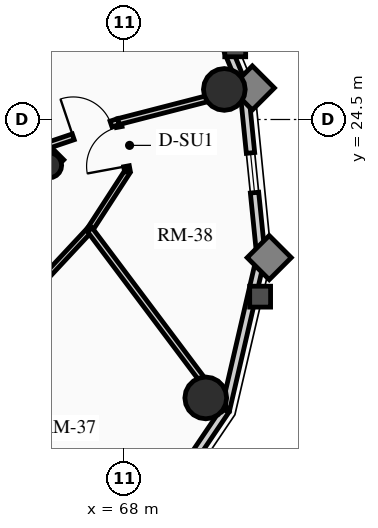
"""IFC4 building model, lengths in metres.
Left out: names, types, materials, properties, quantities, classifications, styles, units other than length and angle.
Written with IfcOpenShell. Run it as: python <this file> out.ifc"""

import sys

from ifc_helpers import new_model, si_unit, direction, frame, frame_2d, origin, origin_2d, place, context, subcontext, project, spatial, rectangle, circle, hollow_circle, extrude, source, transform, mapped, element, fill, save


model = new_model("IFC4")
c1 = context("Model", 3, precision=1e-05, world=origin(), true_north=direction((0.0, 1.0)))
c2 = subcontext(c1, "Body", "Model", "MODEL_VIEW")
j1 = project(units=[si_unit("LENGTHUNIT", "METRE"), si_unit("PLANEANGLEUNIT", "RADIAN")], contexts=[c1])
p1 = place(None, origin())
s1 = spatial("IfcSite", under=j1, at=p1, CompositionType="ELEMENT")
p2 = place(p1, origin())
s2 = spatial("IfcBuilding", under=s1, at=p2, CompositionType="ELEMENT")
p3 = place(p2, frame((0.0, 0.0, 219.94)))
s3 = spatial("IfcBuildingStorey", under=s2, at=p3, CompositionType="ELEMENT", Elevation=219.94)
p4 = place(p3, frame((66.268, 23.298, 0.0), z_axis=(0.0, 0.0, 1.0), x_axis=(-0.707106781187, 0.707106781187, 0.0)))
e1 = element("IfcWall", 1, at=p4, inside=s3, PredefinedType="SHEAR", context=c2, shape_type="SweptSolid", body=[
    extrude(rectangle(XDim=14.1, YDim=0.4, at=frame_2d((7.05, 0.0))), origin(), (0.0, 0.0, 1.0), 2.91),
])
p5 = place(p3, frame((58.561, 15.873, 0.0), z_axis=(0.0, 0.0, 1.0), x_axis=(0.707106781187, 0.707106781187, 0.0)))
e2 = element("IfcWall", 2, at=p5, inside=s3, PredefinedType="SHEAR", context=c2, shape_type="SweptSolid", body=[
    extrude(rectangle(XDim=10.7, YDim=0.4, at=frame_2d((5.35, 0.0))), origin(), (0.0, 0.0, 1.0), 2.91),
])
m1 = source(origin(), c2, "Body", "SweptSolid", [
    extrude(rectangle(XDim=1.5, YDim=2.02, at=frame_2d((0.75, 1.01))), frame((0.0, 0.21, 0.0), z_axis=(0.0, -1.0, 0.0), x_axis=(1.0, 0.0, 0.0)), (0.0, 0.0, 1.0), 0.42),
])
p6 = place(p5, frame((5.45, 0.0, 0.0)))
e3 = element("IfcOpeningElement", 3, at=p6, cuts=e2, PredefinedType="OPENING", context=c2, shape_type="MappedRepresentation", body=[
    mapped(m1, transform((0.0, 0.0, 0.0), x_axis=(1.0, 0.0, 0.0), y_axis=(0.0, 1.0, 0.0), z_axis=(0.0, 0.0, 1.0), scale=1.0)),
])
p7 = place(p3, frame((66.024, 23.294, 0.0), z_axis=(0.0, 0.0, 1.0), x_axis=(0.707106781187, 0.707106781187, 0.0)))
e4 = element("IfcColumn", 4, at=p7, inside=s3, PredefinedType="COLUMN", context=c2, shape_type="SweptSolid", body=[
    extrude(hollow_circle(Radius=0.33, WallThickness=0.025, at=origin_2d()), origin(), (0.0, 0.0, 1.0), 2.91),
])
for number, where, z_axis, x_axis in (
    (5, (70.146, 17.173, 0.0), (0.0, 0.0, 1.0), (1.0, 0.0, 0.0)),
    (6, (70.635, 25.291, 0.0), (0.0, 0.0, 1.0), (1.0, 0.0, 0.0)),
):
    element("IfcColumn", number, at=place(p3, frame(where, z_axis=z_axis, x_axis=x_axis)), inside=s3, PredefinedType="USERDEFINED", context=c2, shape_type="SweptSolid", body=[
        extrude(circle(Radius=0.55, at=origin_2d()), origin(), (0.0, 0.0, 1.0), 2.91),
    ])
p8 = place(p3, frame((70.663, 16.856, 0.0), z_axis=(0.0, 0.0, 1.0), x_axis=(-0.559495003079, -0.828833723692, 0.0)))
e7 = element("IfcWall", 7, at=p8, inside=s3, PredefinedType="SOLIDWALL", context=c2, shape_type="SweptSolid", body=[
    extrude(rectangle(XDim=3.976, YDim=0.22, at=frame_2d((1.988, 0.0))), origin(), (0.0, 0.0, 1.0), 2.322),
])
m2 = source(origin(), c2, "Body", "SweptSolid", [
    extrude(rectangle(XDim=1.05, YDim=1.3, at=frame_2d((0.525, 0.65))), frame((0.0, 0.12, 0.0), z_axis=(0.0, -1.0, 0.0), x_axis=(1.0, 0.0, 0.0)), (0.0, 0.0, 1.0), 0.24),
])
p9 = place(p8, frame((1.463, 0.0, 0.65)))
e8 = element("IfcOpeningElement", 8, at=p9, cuts=e7, PredefinedType="OPENING", context=c2, shape_type="MappedRepresentation", body=[
    mapped(m2, transform((0.0, 0.0, 0.0), x_axis=(1.0, 0.0, 0.0), y_axis=(0.0, 1.0, 0.0), z_axis=(0.0, 0.0, 1.0), scale=1.0)),
])
p10 = place(p3, frame((71.599, 20.9, 0.0), z_axis=(0.0, 0.0, 1.0), x_axis=(-0.225473813158, -0.974249228678, 0.0)))
e9 = element("IfcWall", 9, at=p10, inside=s3, PredefinedType="SOLIDWALL", context=c2, shape_type="SweptSolid", body=[
    extrude(rectangle(XDim=4.15, YDim=0.22, at=frame_2d((2.075, 0.0))), origin(), (0.0, 0.0, 1.0), 2.322),
])
p11 = place(p3, frame((71.155, 25.295, 0.0), z_axis=(0.0, 0.0, 1.0), x_axis=(0.100570534541, -0.994929930991, 0.0)))
e10 = element("IfcWall", 10, at=p11, inside=s3, PredefinedType="SOLIDWALL", context=c2, shape_type="SweptSolid", body=[
    extrude(rectangle(XDim=4.418, YDim=0.22, at=frame_2d((2.209, 0.0))), origin(), (0.0, 0.0, 1.0), 2.322),
])
p12 = place(p11, frame((1.684, 0.0, 0.65)))
e11 = element("IfcOpeningElement", 11, at=p12, cuts=e10, PredefinedType="OPENING", context=c2, shape_type="MappedRepresentation", body=[
    mapped(m2, transform((0.0, 0.0, 0.0), x_axis=(1.0, 0.0, 0.0), y_axis=(0.0, 1.0, 0.0), z_axis=(0.0, 0.0, 1.0), scale=1.0)),
])
p13 = place(p3, frame((69.374, 29.613, 0.0), z_axis=(0.0, 0.0, 1.0), x_axis=(0.381309704956, -0.924447353237, 0.0)))
e12 = element("IfcWall", 12, at=p13, inside=s3, PredefinedType="SOLIDWALL", context=c2, shape_type="SweptSolid", body=[
    extrude(rectangle(XDim=4.671, YDim=0.22, at=frame_2d((2.335, 0.0))), origin(), (0.0, 0.0, 1.0), 2.322),
])
p14 = place(p3, frame((62.736, 16.924, 0.0), z_axis=(0.0, 0.0, 1.0), x_axis=(0.681946700833, 0.731401871219, 0.0)))
e13 = element("IfcWall", 13, at=p14, inside=s3, PredefinedType="PARTITIONING", context=c2, shape_type="SweptSolid", body=[
    extrude(rectangle(XDim=6.393, YDim=0.15, at=frame_2d((3.196, 0.0))), origin(), (0.0, 0.0, 1.0), 2.255),
])
p15 = place(p3, frame((67.095, 21.6, 0.0), z_axis=(0.0, 0.0, 1.0), x_axis=(0.543773190184, 0.839232219137, 0.0)))
e14 = element("IfcWall", 14, at=p15, inside=s3, PredefinedType="PARTITIONING", context=c2, shape_type="SweptSolid", body=[
    extrude(rectangle(XDim=1.823, YDim=0.15, at=frame_2d((0.911, 0.0))), origin(), (0.0, 0.0, 1.0), 2.255),
])
p16 = place(p3, frame((68.086, 23.129, 0.0), z_axis=(0.0, 0.0, 1.0), x_axis=(-0.182004193146, 0.983297754334, 0.0)))
e15 = element("IfcWall", 15, at=p16, inside=s3, PredefinedType="PARTITIONING", context=c2, shape_type="SweptSolid", body=[
    extrude(rectangle(XDim=1.336, YDim=0.15, at=frame_2d((0.668, 0.0))), origin(), (0.0, 0.0, 1.0), 2.322),
])
m3 = source(origin(), c2, "Body", "SweptSolid", [
    extrude(rectangle(XDim=1.05, YDim=2.015, at=frame_2d((0.525, 1.007))), frame((0.0, 0.085, 0.0), z_axis=(0.0, -1.0, 0.0), x_axis=(1.0, 0.0, 0.0)), (0.0, 0.0, 1.0), 0.17),
])
p17 = place(p16, frame((0.143, 0.0, 0.0)))
e16 = element("IfcOpeningElement", 16, at=p17, cuts=e15, PredefinedType="OPENING", context=c2, shape_type="MappedRepresentation", body=[
    mapped(m3, transform((0.0, 0.0, 0.0), x_axis=(1.0, 0.0, 0.0), y_axis=(0.0, 1.0, 0.0), z_axis=(0.0, 0.0, 1.0), scale=1.0)),
])
p18 = place(p3, frame((67.095, 21.6, 0.0), z_axis=(0.0, 0.0, 1.0), x_axis=(0.599947190798, -0.800039604178, 0.0)))
e17 = element("IfcWall", 17, at=p18, inside=s3, PredefinedType="PARTITIONING", context=c2, shape_type="SweptSolid", body=[
    extrude(rectangle(XDim=5.918, YDim=0.16, at=frame_2d((2.959, 0.0))), origin(), (0.0, 0.0, 1.0), 2.322),
])
p19 = place(p3, frame((67.843, 24.443, 0.0), z_axis=(0.0, 0.0, 1.0), x_axis=(0.968303102463, 0.249778105048, 0.0)))
e18 = element("IfcWall", 18, at=p19, inside=s3, PredefinedType="PARTITIONING", context=c2, shape_type="SweptSolid", body=[
    extrude(rectangle(XDim=3.399, YDim=0.16, at=frame_2d((1.7, 0.0))), origin(), (0.0, 0.0, 1.0), 2.322),
])
p20 = place(p3, frame((66.021, 23.828, 0.0), z_axis=(0.0, 0.0, 1.0), x_axis=(0.947522075691, 0.319690344049, 0.0)))
e19 = element("IfcWall", 19, at=p20, inside=s3, PredefinedType="PARTITIONING", context=c2, shape_type="SweptSolid", body=[
    extrude(rectangle(XDim=1.924, YDim=0.16, at=frame_2d((0.962, 0.0))), origin(), (0.0, 0.0, 1.0), 2.255),
])
m4 = source(origin(), c2, "Body", "SweptSolid", [
    extrude(rectangle(XDim=1.05, YDim=2.015, at=frame_2d((0.525, 1.007))), frame((0.0, 0.09, 0.0), z_axis=(0.0, -1.0, 0.0), x_axis=(1.0, 0.0, 0.0)), (0.0, 0.0, 1.0), 0.18),
])
p21 = place(p20, frame((0.674, 0.0, 0.0)))
e20 = element("IfcOpeningElement", 20, at=p21, cuts=e19, PredefinedType="OPENING", context=c2, shape_type="MappedRepresentation", body=[
    mapped(m4, transform((0.0, 0.0, 0.0), x_axis=(1.0, 0.0, 0.0), y_axis=(0.0, 1.0, 0.0), z_axis=(0.0, 0.0, 1.0), scale=1.0)),
])
m5 = source(origin(), c2, "Body", "SweptSolid", [
    extrude(rectangle(XDim=1.05, YDim=1.3, at=frame_2d((0.525, 0.65))), frame((0.0, 0.03, 0.0), z_axis=(0.0, -1.0, 0.0), x_axis=(1.0, 0.0, 0.0)), (0.0, 0.0, 1.0), 0.06),
])
p22 = place(p12, origin())
e21 = element("IfcWindow", 21, at=p22, inside=s3, PartitioningType="SINGLE_PANEL", PredefinedType="WINDOW", context=c2, shape_type="MappedRepresentation", body=[
    mapped(m5, transform((0.0, 0.0, 0.0), x_axis=(1.0, 0.0, 0.0), y_axis=(0.0, 1.0, 0.0), z_axis=(0.0, 0.0, 1.0), scale=1.0)),
])
fill(e11, e21)
m6 = source(origin(), c2, "Body", "SweptSolid", [
    extrude(rectangle(XDim=1.05, YDim=2.015, at=frame_2d((0.525, 1.007))), frame((0.0, 0.025, 0.0), z_axis=(0.0, -1.0, 0.0), x_axis=(1.0, 0.0, 0.0)), (0.0, 0.0, 1.0), 0.05),
])
p23 = place(p21, origin())
e22 = element("IfcDoor", 22, at=p23, inside=s3, OperationType="SINGLE_SWING_LEFT", PredefinedType="DOOR", context=c2, shape_type="MappedRepresentation", body=[
    mapped(m6, transform((0.0, 0.0, 0.0), x_axis=(1.0, 0.0, 0.0), y_axis=(0.0, 1.0, 0.0), z_axis=(0.0, 0.0, 1.0), scale=1.0)),
])
fill(e20, e22)
p24 = place(p17, origin())
e23 = element("IfcDoor", 23, at=p24, inside=s3, OperationType="SINGLE_SWING_LEFT", PredefinedType="DOOR", context=c2, shape_type="MappedRepresentation", body=[
    mapped(m6, transform((0.0, 0.0, 0.0), x_axis=(1.0, 0.0, 0.0), y_axis=(0.0, 1.0, 0.0), z_axis=(0.0, 0.0, 1.0), scale=1.0)),
])
fill(e16, e23)
save(model, sys.argv[1])
